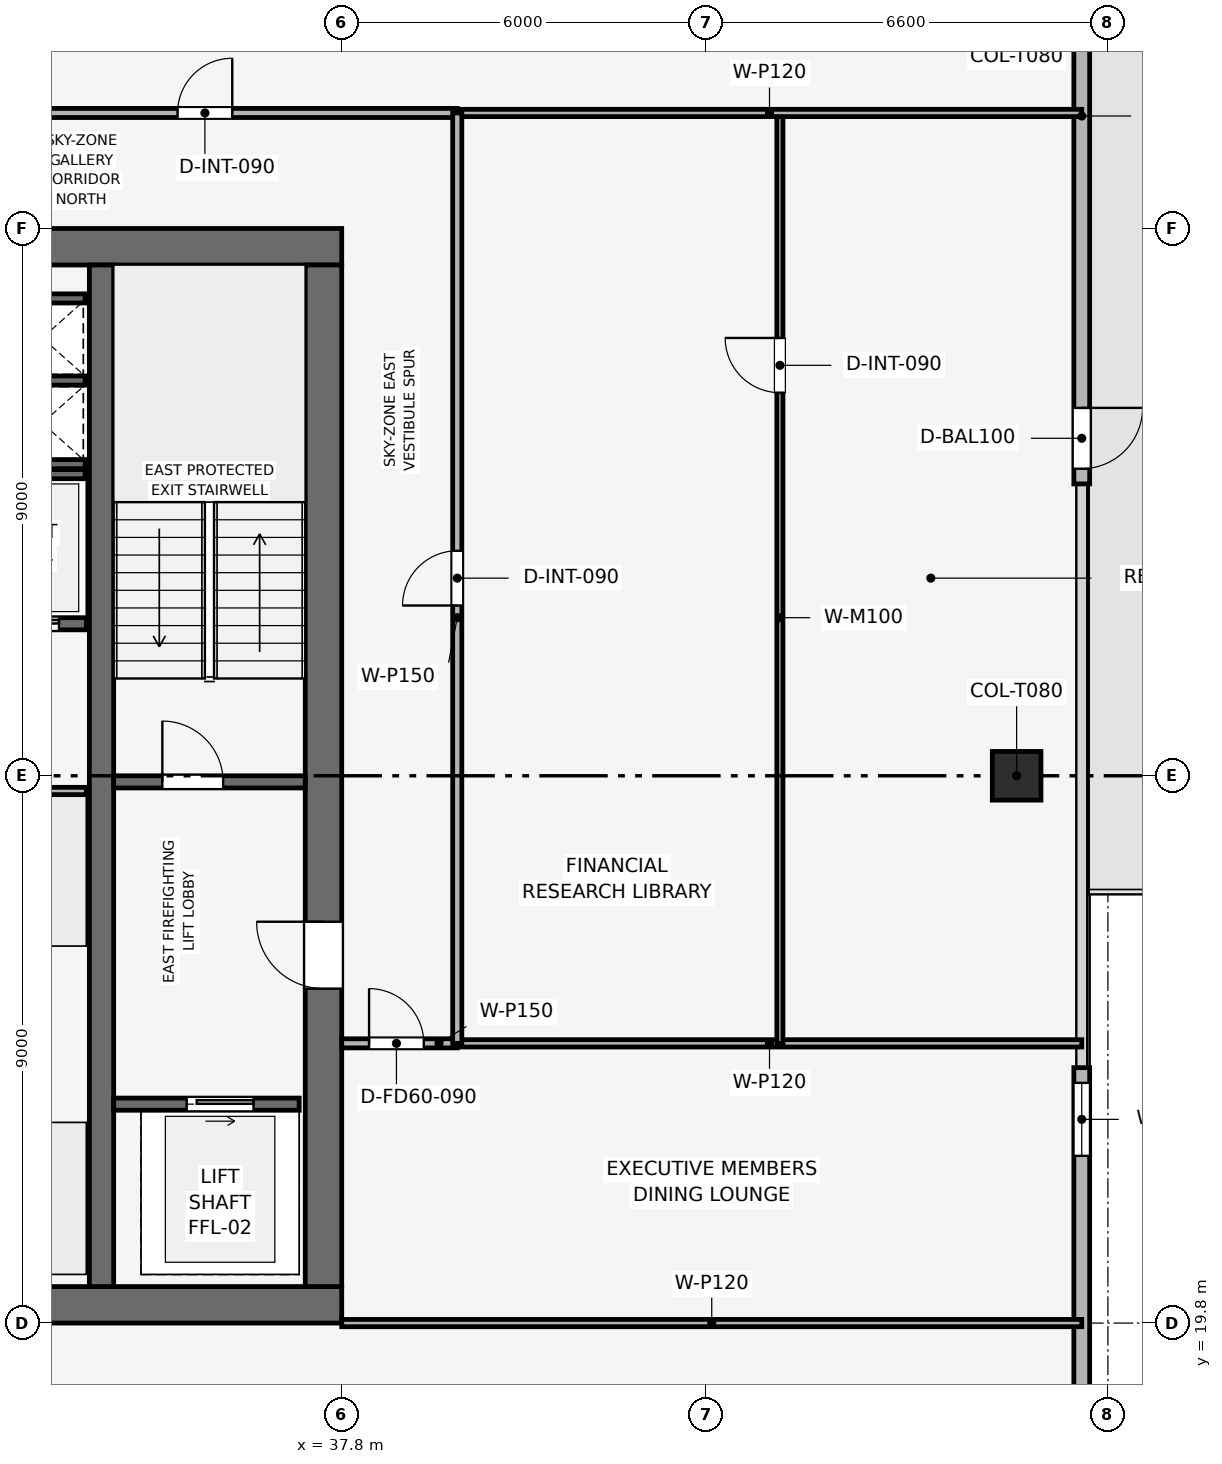
"""IFC4 building model, lengths in metres.
Left out: names, types, materials, properties, quantities, classifications, styles, units other than length and angle.
Written with IfcOpenShell. Run it as: python <this file> out.ifc"""

import sys

from ifc_helpers import new_model, si_unit, direction, frame, frame_2d, origin, origin_2d, place, context, subcontext, project, spatial, rectangle, extrude, element, fill, save


model = new_model("IFC4")
c1 = context("Model", 3, precision=1e-05, world=origin(), true_north=direction((0.0, 1.0)))
c2 = subcontext(c1, "Body", "Model", "MODEL_VIEW")
j1 = project(units=[si_unit("LENGTHUNIT", "METRE"), si_unit("PLANEANGLEUNIT", "RADIAN")], contexts=[c1])
p1 = place(None, origin())
s1 = spatial("IfcSite", under=j1, at=p1, CompositionType="ELEMENT")
p2 = place(p1, origin())
s2 = spatial("IfcBuilding", under=s1, at=p2, CompositionType="ELEMENT")
p3 = place(p2, frame((0.0, 0.0, 351.75)))
s3 = spatial("IfcBuildingStorey", under=s2, at=p3, CompositionType="ELEMENT", Elevation=351.75)
p4 = place(p3, frame((19.8, 20.1, 0.0), z_axis=(0.0, 0.0, 1.0), x_axis=(1.0, 0.0, 0.0)))
e1 = element("IfcWall", 1, at=p4, inside=s3, PredefinedType="SHEAR", context=c2, shape_type="SweptSolid", body=[
    extrude(rectangle(XDim=18.0, YDim=0.6, at=frame_2d((9.0, 0.0))), origin(), (0.0, 0.0, 1.0), 3.75),
])
p5 = place(p3, frame((19.8, 37.5, 0.0), z_axis=(0.0, 0.0, 1.0), x_axis=(1.0, 0.0, 0.0)))
e2 = element("IfcWall", 2, at=p5, inside=s3, PredefinedType="SHEAR", context=c2, shape_type="SweptSolid", body=[
    extrude(rectangle(XDim=18.0, YDim=0.6, at=frame_2d((9.0, 0.0))), origin(), (0.0, 0.0, 1.0), 3.75),
])
p6 = place(p5, frame((7.05, 0.0, 0.0)))
e3 = element("IfcOpeningElement", 3, at=p6, cuts=e2, PredefinedType="OPENING", context=c2, shape_type="SweptSolid", body=[
    extrude(rectangle(XDim=1.1, YDim=2.15, at=frame_2d((0.55, 1.075))), frame((0.0, 0.31, 0.0), z_axis=(0.0, -1.0, 0.0), x_axis=(1.0, 0.0, 0.0)), (0.0, 0.0, 1.0), 0.62),
])
p7 = place(p3, frame((37.5, 20.4, 0.0), z_axis=(0.0, 0.0, 1.0), x_axis=(0.0, 1.0, 0.0)))
e4 = element("IfcWall", 4, at=p7, inside=s3, PredefinedType="SHEAR", context=c2, shape_type="SweptSolid", body=[
    extrude(rectangle(XDim=16.8, YDim=0.6, at=frame_2d((8.4, 0.0))), origin(), (0.0, 0.0, 1.0), 3.75),
])
p8 = place(p7, frame((4.9, 0.0, 0.0)))
e5 = element("IfcOpeningElement", 5, at=p8, cuts=e4, PredefinedType="OPENING", context=c2, shape_type="SweptSolid", body=[
    extrude(rectangle(XDim=1.1, YDim=2.15, at=frame_2d((0.55, 1.075))), frame((0.0, 0.31, 0.0), z_axis=(0.0, -1.0, 0.0), x_axis=(1.0, 0.0, 0.0)), (0.0, 0.0, 1.0), 0.62),
])
p9 = place(p3, frame((33.85, 20.4, 0.0), z_axis=(0.0, 0.0, 1.0), x_axis=(0.0, 1.0, 0.0)))
e6 = element("IfcWall", 6, at=p9, inside=s3, PredefinedType="SHEAR", context=c2, shape_type="SweptSolid", body=[
    extrude(rectangle(XDim=16.8, YDim=0.4, at=frame_2d((8.4, 0.0))), origin(), (0.0, 0.0, 1.0), 3.75),
])
p10 = place(p3, frame((48.899, 28.8, 0.003), z_axis=(-0.233305947424, 0.0, 0.972403380751), x_axis=(0.0, -1.0, 0.0)))
e7 = element("IfcColumn", 7, at=p10, inside=s3, PredefinedType="COLUMN", context=c2, shape_type="SweptSolid", body=[
    extrude(rectangle(XDim=0.8, YDim=0.8, at=origin_2d()), origin(), (0.0, 0.0, 1.0), 3.583),
])
p11 = place(p3, frame((49.97, 44.3, 0.0), z_axis=(0.0, 0.0, 1.0), x_axis=(0.0, -1.0, 0.0)))
e8 = element("IfcWall", 8, at=p11, inside=s3, PredefinedType="SOLIDWALL", context=c2, shape_type="SweptSolid", body=[
    extrude(rectangle(XDim=10.7, YDim=0.26, at=frame_2d((5.35, 0.0))), origin(), (0.0, 0.0, 1.0), 3.49),
])
p12 = place(p11, frame((9.45, 0.0, 0.0)))
e9 = element("IfcOpeningElement", 9, at=p12, cuts=e8, PredefinedType="OPENING", context=c2, shape_type="SweptSolid", body=[
    extrude(rectangle(XDim=1.0, YDim=2.2, at=frame_2d((0.5, 1.1))), frame((0.0, 0.14, 0.0), z_axis=(0.0, -1.0, 0.0), x_axis=(1.0, 0.0, 0.0)), (0.0, 0.0, 1.0), 0.28),
])
p13 = place(p3, frame((49.97, 24.0, 0.0), z_axis=(0.0, 0.0, 1.0), x_axis=(0.0, -1.0, 0.0)))
e10 = element("IfcWall", 10, at=p13, inside=s3, PredefinedType="SOLIDWALL", context=c2, shape_type="SweptSolid", body=[
    extrude(rectangle(XDim=10.7, YDim=0.26, at=frame_2d((5.35, 0.0))), origin(), (0.0, 0.0, 1.0), 3.49),
])
p14 = place(p13, frame((0.25, 0.0, 0.9)))
e11 = element("IfcOpeningElement", 11, at=p14, cuts=e10, PredefinedType="OPENING", context=c2, shape_type="SweptSolid", body=[
    extrude(rectangle(XDim=1.2, YDim=2.1, at=frame_2d((0.6, 1.05))), frame((0.0, 0.14, 0.0), z_axis=(0.0, -1.0, 0.0), x_axis=(1.0, 0.0, 0.0)), (0.0, 0.0, 1.0), 0.28),
])
p15 = place(p3, frame((34.05, 28.7, 0.0), z_axis=(0.0, 0.0, 1.0), x_axis=(1.0, 0.0, 0.0)))
e12 = element("IfcWall", 12, at=p15, inside=s3, PredefinedType="SHEAR", context=c2, shape_type="SweptSolid", body=[
    extrude(rectangle(XDim=3.15, YDim=0.2, at=frame_2d((1.575, 0.0))), origin(), (0.0, 0.0, 1.0), 3.49),
])
p16 = place(p15, frame((0.8, 0.0, 0.0)))
e13 = element("IfcOpeningElement", 13, at=p16, cuts=e12, PredefinedType="OPENING", context=c2, shape_type="SweptSolid", body=[
    extrude(rectangle(XDim=1.0, YDim=2.1, at=frame_2d((0.5, 1.05))), frame((0.0, 0.11, 0.0), z_axis=(0.0, -1.0, 0.0), x_axis=(1.0, 0.0, 0.0)), (0.0, 0.0, 1.0), 0.22),
])
for number, where, z_axis, x_axis in (
    (14, (32.25, 33.925, 0.0), (0.0, 0.0, 1.0), (1.0, 0.0, 0.0)),
    (15, (32.25, 35.3, 0.0), (0.0, 0.0, 1.0), (1.0, 0.0, 0.0)),
):
    element("IfcWall", number, at=place(p3, frame(where, z_axis=z_axis, x_axis=x_axis)), inside=s3, PredefinedType="SHEAR", context=c2, shape_type="SweptSolid", body=[
        extrude(rectangle(XDim=1.33, YDim=0.15, at=frame_2d((0.665, 0.0))), origin(), (0.0, 0.0, 1.0), 3.49),
    ])
p17 = place(p3, frame((34.05, 23.4, 0.0), z_axis=(0.0, 0.0, 1.0), x_axis=(1.0, 0.0, 0.0)))
e16 = element("IfcWall", 16, at=p17, inside=s3, PredefinedType="SHEAR", context=c2, shape_type="SweptSolid", body=[
    extrude(rectangle(XDim=3.05, YDim=0.2, at=frame_2d((1.525, 0.0))), origin(), (0.0, 0.0, 1.0), 3.49),
])
p18 = place(p17, frame((1.2, 0.0, 0.0)))
e17 = element("IfcOpeningElement", 17, at=p18, cuts=e16, PredefinedType="OPENING", context=c2, shape_type="SweptSolid", body=[
    extrude(rectangle(XDim=1.1, YDim=2.15, at=frame_2d((0.55, 1.075))), frame((0.0, 0.11, 0.0), z_axis=(0.0, -1.0, 0.0), x_axis=(1.0, 0.0, 0.0)), (0.0, 0.0, 1.0), 0.22),
])
p19 = place(p3, frame((31.6, 31.3, 0.0), z_axis=(0.0, 0.0, 1.0), x_axis=(1.0, 0.0, 0.0)))
e18 = element("IfcWall", 18, at=p19, inside=s3, PredefinedType="SHEAR", context=c2, shape_type="SweptSolid", body=[
    extrude(rectangle(XDim=2.0, YDim=0.2, at=frame_2d((1.0, 0.0))), origin(), (0.0, 0.0, 1.0), 3.49),
])
p20 = place(p19, frame((0.45, 0.0, 0.0)))
e19 = element("IfcOpeningElement", 19, at=p20, cuts=e18, PredefinedType="OPENING", context=c2, shape_type="SweptSolid", body=[
    extrude(rectangle(XDim=1.1, YDim=2.15, at=frame_2d((0.55, 1.075))), frame((0.0, 0.11, 0.0), z_axis=(0.0, -1.0, 0.0), x_axis=(1.0, 0.0, 0.0)), (0.0, 0.0, 1.0), 0.22),
])
p21 = place(p3, frame((32.25, 36.65, 0.0), z_axis=(0.0, 0.0, 1.0), x_axis=(1.0, 0.0, 0.0)))
e20 = element("IfcWall", 20, at=p21, inside=s3, PredefinedType="SHEAR", context=c2, shape_type="SweptSolid", body=[
    extrude(rectangle(XDim=1.33, YDim=0.15, at=frame_2d((0.665, 0.0))), origin(), (0.0, 0.0, 1.0), 3.49),
])
p22 = place(p3, frame((29.5, 33.76, 0.0), z_axis=(0.0, 0.0, 1.0), x_axis=(1.0, 0.0, 0.0)))
e21 = element("IfcWall", 21, at=p22, inside=s3, PredefinedType="SHEAR", context=c2, shape_type="SweptSolid", body=[
    extrude(rectangle(XDim=4.08, YDim=0.15, at=frame_2d((2.04, 0.0))), origin(), (0.0, 0.0, 1.0), 3.49),
])
p23 = place(p3, frame((29.55, 28.55, 0.0), z_axis=(0.0, 0.0, 1.0), x_axis=(1.0, 0.0, 0.0)))
e22 = element("IfcWall", 22, at=p23, inside=s3, PredefinedType="PARTITIONING", context=c2, shape_type="SweptSolid", body=[
    extrude(rectangle(XDim=4.05, YDim=0.12, at=frame_2d((2.025, 0.0))), origin(), (0.0, 0.0, 1.0), 3.49),
])
p24 = place(p23, frame((1.575, 0.0, 0.0)))
e23 = element("IfcOpeningElement", 23, at=p24, cuts=e22, PredefinedType="OPENING", context=c2, shape_type="SweptSolid", body=[
    extrude(rectangle(XDim=0.9, YDim=2.1, at=frame_2d((0.45, 1.05))), frame((0.0, 0.07, 0.0), z_axis=(0.0, -1.0, 0.0), x_axis=(1.0, 0.0, 0.0)), (0.0, 0.0, 1.0), 0.14),
])
p25 = place(p3, frame((37.8, 19.8, 0.0), z_axis=(0.0, 0.0, 1.0), x_axis=(1.0, 0.0, 0.0)))
e24 = element("IfcWall", 24, at=p25, inside=s3, PredefinedType="PARTITIONING", context=c2, shape_type="SweptSolid", body=[
    extrude(rectangle(XDim=12.17, YDim=0.12, at=frame_2d((6.085, 0.0))), origin(), (0.0, 0.0, 1.0), 3.075),
])
p26 = place(p3, frame((37.8, 24.4, 0.0), z_axis=(0.0, 0.0, 1.0), x_axis=(1.0, 0.0, 0.0)))
e25 = element("IfcWall", 25, at=p26, inside=s3, PredefinedType="PARTITIONING", context=c2, shape_type="SweptSolid", body=[
    extrude(rectangle(XDim=1.9, YDim=0.15, at=frame_2d((0.95, 0.0))), origin(), (0.0, 0.0, 1.0), 3.49),
])
p27 = place(p26, frame((0.45, 0.0, 0.0)))
e26 = element("IfcOpeningElement", 26, at=p27, cuts=e25, PredefinedType="OPENING", context=c2, shape_type="SweptSolid", body=[
    extrude(rectangle(XDim=0.9, YDim=2.1, at=frame_2d((0.45, 1.05))), frame((0.0, 0.085, 0.0), z_axis=(0.0, -1.0, 0.0), x_axis=(1.0, 0.0, 0.0)), (0.0, 0.0, 1.0), 0.17),
])
p28 = place(p3, frame((39.7, 24.4, 0.0), z_axis=(0.0, 0.0, 1.0), x_axis=(1.0, 0.0, 0.0)))
e27 = element("IfcWall", 27, at=p28, inside=s3, PredefinedType="PARTITIONING", context=c2, shape_type="SweptSolid", body=[
    extrude(rectangle(XDim=10.27, YDim=0.12, at=frame_2d((5.135, 0.0))), origin(), (0.0, 0.0, 1.0), 3.115),
])
p29 = place(p3, frame((45.006, 24.4, 0.0), z_axis=(0.0, 0.0, 1.0), x_axis=(0.0, 1.0, 0.0)))
e28 = element("IfcWall", 28, at=p29, inside=s3, PredefinedType="MOVABLE", context=c2, shape_type="SweptSolid", body=[
    extrude(rectangle(XDim=15.3, YDim=0.1, at=frame_2d((7.65, 0.0))), origin(), (0.0, 0.0, 1.0), 3.075),
])
p30 = place(p29, frame((10.7, 0.0, 0.0)))
e29 = element("IfcOpeningElement", 29, at=p30, cuts=e28, PredefinedType="OPENING", context=c2, shape_type="SweptSolid", body=[
    extrude(rectangle(XDim=0.9, YDim=2.1, at=frame_2d((0.45, 1.05))), frame((0.0, 0.06, 0.0), z_axis=(0.0, -1.0, 0.0), x_axis=(1.0, 0.0, 0.0)), (0.0, 0.0, 1.0), 0.12),
])
p31 = place(p3, frame((39.7, 39.7, 0.0), z_axis=(0.0, 0.0, 1.0), x_axis=(1.0, 0.0, 0.0)))
e30 = element("IfcWall", 30, at=p31, inside=s3, PredefinedType="PARTITIONING", context=c2, shape_type="SweptSolid", body=[
    extrude(rectangle(XDim=10.27, YDim=0.12, at=frame_2d((5.135, 0.0))), origin(), (0.0, 0.0, 1.0), 3.075),
])
p32 = place(p3, frame((17.9, 39.7, 0.0), z_axis=(0.0, 0.0, 1.0), x_axis=(1.0, 0.0, 0.0)))
e31 = element("IfcWall", 31, at=p32, inside=s3, PredefinedType="PARTITIONING", context=c2, shape_type="SweptSolid", body=[
    extrude(rectangle(XDim=21.8, YDim=0.15, at=frame_2d((10.9, 0.0))), origin(), (0.0, 0.0, 1.0), 3.075),
])
p33 = place(p32, frame((2.1, 0.0, 0.0)))
e32 = element("IfcOpeningElement", 32, at=p33, cuts=e31, PredefinedType="OPENING", context=c2, shape_type="SweptSolid", body=[
    extrude(rectangle(XDim=0.9, YDim=2.1, at=frame_2d((0.45, 1.05))), frame((0.0, 0.085, 0.0), z_axis=(0.0, -1.0, 0.0), x_axis=(1.0, 0.0, 0.0)), (0.0, 0.0, 1.0), 0.17),
])
p34 = place(p32, frame((6.05, 0.0, 0.0)))
e33 = element("IfcOpeningElement", 33, at=p34, cuts=e31, PredefinedType="OPENING", context=c2, shape_type="SweptSolid", body=[
    extrude(rectangle(XDim=0.9, YDim=2.1, at=frame_2d((0.45, 1.05))), frame((0.0, 0.085, 0.0), z_axis=(0.0, -1.0, 0.0), x_axis=(1.0, 0.0, 0.0)), (0.0, 0.0, 1.0), 0.17),
])
p35 = place(p32, frame((8.95, 0.0, 0.0)))
e34 = element("IfcOpeningElement", 34, at=p35, cuts=e31, PredefinedType="OPENING", context=c2, shape_type="SweptSolid", body=[
    extrude(rectangle(XDim=0.9, YDim=2.1, at=frame_2d((0.45, 1.05))), frame((0.0, 0.085, 0.0), z_axis=(0.0, -1.0, 0.0), x_axis=(1.0, 0.0, 0.0)), (0.0, 0.0, 1.0), 0.17),
])
p36 = place(p32, frame((11.7, 0.0, 0.0)))
e35 = element("IfcOpeningElement", 35, at=p36, cuts=e31, PredefinedType="OPENING", context=c2, shape_type="SweptSolid", body=[
    extrude(rectangle(XDim=0.95, YDim=2.1, at=frame_2d((0.475, 1.05))), frame((0.0, 0.085, 0.0), z_axis=(0.0, -1.0, 0.0), x_axis=(1.0, 0.0, 0.0)), (0.0, 0.0, 1.0), 0.17),
])
p37 = place(p32, frame((17.2, 0.0, 0.0)))
e36 = element("IfcOpeningElement", 36, at=p37, cuts=e31, PredefinedType="OPENING", context=c2, shape_type="SweptSolid", body=[
    extrude(rectangle(XDim=0.9, YDim=2.1, at=frame_2d((0.45, 1.05))), frame((0.0, 0.085, 0.0), z_axis=(0.0, -1.0, 0.0), x_axis=(1.0, 0.0, 0.0)), (0.0, 0.0, 1.0), 0.17),
])
p38 = place(p3, frame((39.7, 24.4, 0.0), z_axis=(0.0, 0.0, 1.0), x_axis=(0.0, 1.0, 0.0)))
e37 = element("IfcWall", 37, at=p38, inside=s3, PredefinedType="PARTITIONING", context=c2, shape_type="SweptSolid", body=[
    extrude(rectangle(XDim=15.3, YDim=0.15, at=frame_2d((7.65, 0.0))), origin(), (0.0, 0.0, 1.0), 3.075),
])
p39 = place(p38, frame((7.2, 0.0, 0.0)))
e38 = element("IfcOpeningElement", 38, at=p39, cuts=e37, PredefinedType="OPENING", context=c2, shape_type="SweptSolid", body=[
    extrude(rectangle(XDim=0.9, YDim=2.1, at=frame_2d((0.45, 1.05))), frame((0.0, 0.085, 0.0), z_axis=(0.0, -1.0, 0.0), x_axis=(1.0, 0.0, 0.0)), (0.0, 0.0, 1.0), 0.17),
])
p40 = place(p12, origin())
e39 = element("IfcDoor", 39, at=p40, inside=s3, OperationType="SINGLE_SWING_LEFT", PredefinedType="DOOR", context=c2, shape_type="SweptSolid", body=[
    extrude(rectangle(XDim=1.0, YDim=2.2, at=frame_2d((0.5, 1.1))), frame((0.0, 0.025, 0.0), z_axis=(0.0, -1.0, 0.0), x_axis=(1.0, 0.0, 0.0)), (0.0, 0.0, 1.0), 0.05),
])
fill(e9, e39)
p41 = place(p14, origin())
e40 = element("IfcWindow", 40, at=p41, inside=s3, PartitioningType="SINGLE_PANEL", PredefinedType="WINDOW", context=c2, shape_type="SweptSolid", body=[
    extrude(rectangle(XDim=1.2, YDim=2.1, at=frame_2d((0.6, 1.05))), frame((0.0, 0.03, 0.0), z_axis=(0.0, -1.0, 0.0), x_axis=(1.0, 0.0, 0.0)), (0.0, 0.0, 1.0), 0.06),
])
fill(e11, e40)
p42 = place(p16, origin())
e41 = element("IfcDoor", 41, at=p42, inside=s3, OperationType="SINGLE_SWING_LEFT", PredefinedType="DOOR", context=c2, shape_type="SweptSolid", body=[
    extrude(rectangle(XDim=1.0, YDim=2.1, at=frame_2d((0.5, 1.05))), frame((0.0, 0.025, 0.0), z_axis=(0.0, -1.0, 0.0), x_axis=(1.0, 0.0, 0.0)), (0.0, 0.0, 1.0), 0.05),
])
fill(e13, e41)
p43 = place(p18, origin())
e42 = element("IfcDoor", 42, at=p43, inside=s3, OperationType="SLIDING_TO_RIGHT", PredefinedType="DOOR", context=c2, shape_type="SweptSolid", body=[
    extrude(rectangle(XDim=1.1, YDim=2.15, at=frame_2d((0.55, 1.075))), frame((0.0, 0.025, 0.0), z_axis=(0.0, -1.0, 0.0), x_axis=(1.0, 0.0, 0.0)), (0.0, 0.0, 1.0), 0.05),
])
fill(e17, e42)
p44 = place(p20, origin())
e43 = element("IfcDoor", 43, at=p44, inside=s3, OperationType="SLIDING_TO_RIGHT", PredefinedType="DOOR", context=c2, shape_type="SweptSolid", body=[
    extrude(rectangle(XDim=1.1, YDim=2.15, at=frame_2d((0.55, 1.075))), frame((0.0, 0.025, 0.0), z_axis=(0.0, -1.0, 0.0), x_axis=(1.0, 0.0, 0.0)), (0.0, 0.0, 1.0), 0.05),
])
fill(e19, e43)
p45 = place(p27, origin())
e44 = element("IfcDoor", 44, at=p45, inside=s3, OperationType="SINGLE_SWING_LEFT", PredefinedType="DOOR", context=c2, shape_type="SweptSolid", body=[
    extrude(rectangle(XDim=0.9, YDim=2.1, at=frame_2d((0.45, 1.05))), frame((0.0, 0.025, 0.0), z_axis=(0.0, -1.0, 0.0), x_axis=(1.0, 0.0, 0.0)), (0.0, 0.0, 1.0), 0.05),
])
fill(e26, e44)
p46 = place(p30, origin())
e45 = element("IfcDoor", 45, at=p46, inside=s3, OperationType="SINGLE_SWING_RIGHT", PredefinedType="DOOR", context=c2, shape_type="SweptSolid", body=[
    extrude(rectangle(XDim=0.9, YDim=2.1, at=frame_2d((0.45, 1.05))), frame((0.0, 0.025, 0.0), z_axis=(0.0, -1.0, 0.0), x_axis=(1.0, 0.0, 0.0)), (0.0, 0.0, 1.0), 0.05),
])
fill(e29, e45)
p47 = place(p37, origin())
e46 = element("IfcDoor", 46, at=p47, inside=s3, OperationType="SINGLE_SWING_RIGHT", PredefinedType="DOOR", context=c2, shape_type="SweptSolid", body=[
    extrude(rectangle(XDim=0.9, YDim=2.1, at=frame_2d((0.45, 1.05))), frame((0.0, 0.025, 0.0), z_axis=(0.0, -1.0, 0.0), x_axis=(1.0, 0.0, 0.0)), (0.0, 0.0, 1.0), 0.05),
])
fill(e36, e46)
p48 = place(p39, origin())
e47 = element("IfcDoor", 47, at=p48, inside=s3, OperationType="SINGLE_SWING_LEFT", PredefinedType="DOOR", context=c2, shape_type="SweptSolid", body=[
    extrude(rectangle(XDim=0.9, YDim=2.1, at=frame_2d((0.45, 1.05))), frame((0.0, 0.025, 0.0), z_axis=(0.0, -1.0, 0.0), x_axis=(1.0, 0.0, 0.0)), (0.0, 0.0, 1.0), 0.05),
])
fill(e38, e47)
p49 = place(p8, origin())
e48 = element("IfcDoor", 48, at=p49, inside=s3, OperationType="SINGLE_SWING_RIGHT", PredefinedType="DOOR", context=c2, shape_type="SweptSolid", body=[
    extrude(rectangle(XDim=1.1, YDim=2.15, at=frame_2d((0.55, 1.075))), frame((0.0, 0.025, 0.0), z_axis=(0.0, -1.0, 0.0), x_axis=(1.0, 0.0, 0.0)), (0.0, 0.0, 1.0), 0.05),
])
fill(e5, e48)
save(model, sys.argv[1])
